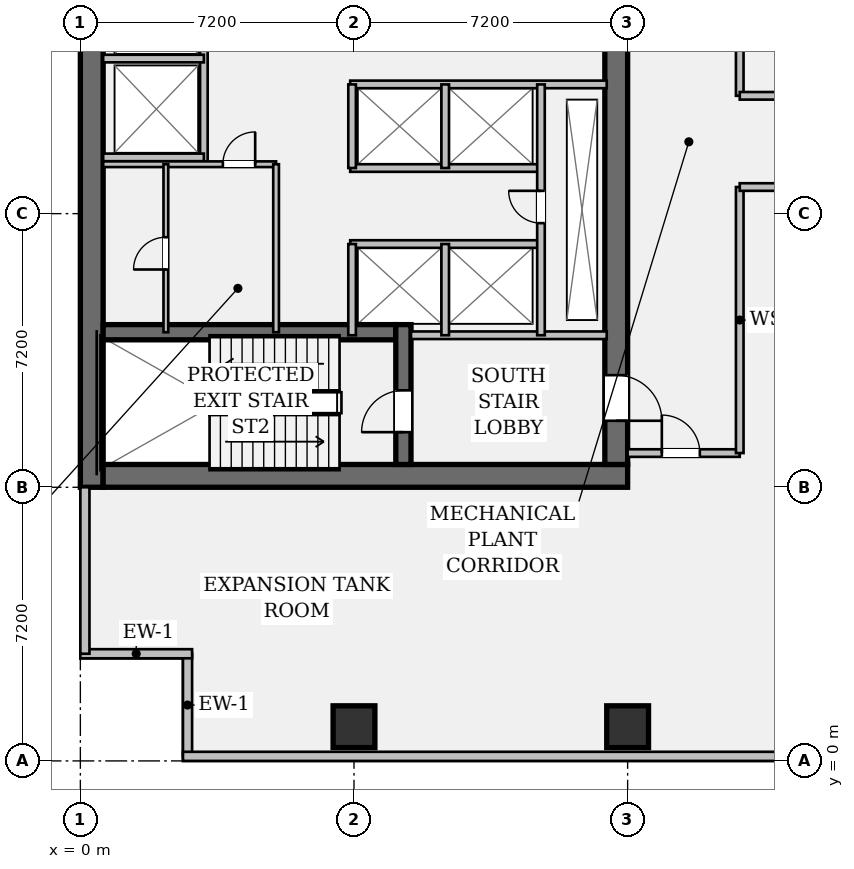
"""IFC4 building model, lengths in metres.
Left out: names, types, materials, properties, quantities, classifications, styles, units other than length and angle.
Written with IfcOpenShell. Run it as: python <this file> out.ifc"""

import sys

from ifc_helpers import new_model, si_unit, direction, frame, frame_2d, origin, origin_2d, place, context, subcontext, project, spatial, rectangle, hollow_rectangle, extrude, element, fill, save


model = new_model("IFC4")
c1 = context("Model", 3, precision=1e-05, world=origin(), true_north=direction((0.0, 1.0)))
c2 = subcontext(c1, "Body", "Model", "MODEL_VIEW")
j1 = project(units=[si_unit("LENGTHUNIT", "METRE"), si_unit("PLANEANGLEUNIT", "RADIAN")], contexts=[c1])
p1 = place(None, origin())
s1 = spatial("IfcSite", under=j1, at=p1, CompositionType="ELEMENT")
p2 = place(p1, origin())
s2 = spatial("IfcBuilding", under=s1, at=p2, CompositionType="ELEMENT")
p3 = place(p2, frame((0.0, 0.0, 26.25)))
s3 = spatial("IfcBuildingStorey", under=s2, at=p3, CompositionType="ELEMENT", Elevation=26.25)
p4 = place(p3, frame((0.3, 7.2, 0.0), z_axis=(0.0, 0.0, 1.0), x_axis=(0.0, 1.0, 0.0)))
e1 = element("IfcWall", 1, at=p4, inside=s3, PredefinedType="SHEAR", context=c2, shape_type="SweptSolid", body=[
    extrude(rectangle(XDim=28.8, YDim=0.6, at=frame_2d((14.4, 0.0))), origin(), (0.0, 0.0, 1.0), 4.62),
])
p5 = place(p3, frame((0.6, 7.5, 0.0), z_axis=(0.0, 0.0, 1.0), x_axis=(1.0, 0.0, 0.0)))
e2 = element("IfcWall", 2, at=p5, inside=s3, PredefinedType="SHEAR", context=c2, shape_type="SweptSolid", body=[
    extrude(rectangle(XDim=13.8, YDim=0.6, at=frame_2d((6.9, 0.0))), origin(), (0.0, 0.0, 1.0), 4.62),
])
p6 = place(p3, frame((14.1, 35.4, 0.0), z_axis=(0.0, 0.0, 1.0), x_axis=(0.0, -1.0, 0.0)))
e3 = element("IfcWall", 3, at=p6, inside=s3, PredefinedType="SHEAR", context=c2, shape_type="SweptSolid", body=[
    extrude(rectangle(XDim=27.6, YDim=0.6, at=frame_2d((13.8, 0.0))), origin(), (0.0, 0.0, 1.0), 4.62),
])
p7 = place(p6, frame((1.3, 0.0, 0.0)))
e4 = element("IfcOpeningElement", 4, at=p7, cuts=e3, PredefinedType="OPENING", context=c2, shape_type="SweptSolid", body=[
    extrude(rectangle(XDim=1.2, YDim=2.15, at=frame_2d((0.6, 1.075))), frame((0.0, 0.312, 0.0), z_axis=(0.0, -1.0, 0.0), x_axis=(1.0, 0.0, 0.0)), (0.0, 0.0, 1.0), 0.624),
])
p8 = place(p6, frame((25.25, 0.0, 0.0)))
e5 = element("IfcOpeningElement", 5, at=p8, cuts=e3, PredefinedType="OPENING", context=c2, shape_type="SweptSolid", body=[
    extrude(rectangle(XDim=1.2, YDim=2.15, at=frame_2d((0.6, 1.075))), frame((0.0, 0.312, 0.0), z_axis=(0.0, -1.0, 0.0), x_axis=(1.0, 0.0, 0.0)), (0.0, 0.0, 1.0), 0.624),
])
p9 = place(p6, frame((14.6, 0.0, 0.0)))
e6 = element("IfcOpeningElement", 6, at=p9, cuts=e3, PredefinedType="OPENING", context=c2, shape_type="SweptSolid", body=[
    extrude(rectangle(XDim=1.6, YDim=2.2, at=frame_2d((0.8, 1.1))), frame((0.0, 0.312, 0.0), z_axis=(0.0, -1.0, 0.0), x_axis=(1.0, 0.0, 0.0)), (0.0, 0.0, 1.0), 0.624),
])
p10 = place(p3, frame((0.6, 11.28, 0.0), z_axis=(0.0, 0.0, 1.0), x_axis=(1.0, 0.0, 0.0)))
e7 = element("IfcWall", 7, at=p10, inside=s3, PredefinedType="SHEAR", context=c2, shape_type="SweptSolid", body=[
    extrude(rectangle(XDim=7.7, YDim=0.4, at=frame_2d((3.85, 0.0))), origin(), (0.0, 0.0, 1.0), 4.62),
])
p11 = place(p3, frame((8.5, 7.8, 0.0), z_axis=(0.0, 0.0, 1.0), x_axis=(0.0, 1.0, 0.0)))
e8 = element("IfcWall", 8, at=p11, inside=s3, PredefinedType="SHEAR", context=c2, shape_type="SweptSolid", body=[
    extrude(rectangle(XDim=3.68, YDim=0.4, at=frame_2d((1.84, 0.0))), origin(), (0.0, 0.0, 1.0), 4.62),
])
p12 = place(p11, frame((0.85, 0.0, 0.0)))
e9 = element("IfcOpeningElement", 9, at=p12, cuts=e8, PredefinedType="OPENING", context=c2, shape_type="SweptSolid", body=[
    extrude(rectangle(XDim=1.1, YDim=2.15, at=frame_2d((0.55, 1.075))), frame((0.0, 0.212, 0.0), z_axis=(0.0, -1.0, 0.0), x_axis=(1.0, 0.0, 0.0)), (0.0, 0.0, 1.0), 0.424),
])
for number, where, z_axis, x_axis in (
    (10, (7.2, 0.9, 0.0), (0.0, 0.0, 1.0), (1.0, 0.0, 0.0)),
    (11, (14.4, 0.9, 0.0), (0.0, 0.0, 1.0), (1.0, 0.0, 0.0)),
):
    element("IfcColumn", number, at=place(p3, frame(where, z_axis=z_axis, x_axis=x_axis)), inside=s3, PredefinedType="COLUMN", context=c2, shape_type="SweptSolid", body=[
        extrude(hollow_rectangle(XDim=1.1, YDim=1.1, WallThickness=0.07, at=origin_2d()), origin(), (0.0, 0.0, 1.0), 4.62),
    ])
p13 = place(p3, frame((2.82, 0.12, 0.0), z_axis=(0.0, 0.0, 1.0), x_axis=(0.0, 1.0, 0.0)))
e12 = element("IfcWall", 12, at=p13, inside=s3, PredefinedType="STANDARD", context=c2, shape_type="SweptSolid", body=[
    extrude(rectangle(XDim=2.7, YDim=0.24, at=frame_2d((1.35, 0.0))), origin(), (0.0, 0.0, 1.0), 4.62),
])
p14 = place(p3, frame((2.94, 2.82, 0.0), z_axis=(0.0, 0.0, 1.0), x_axis=(-1.0, 0.0, 0.0)))
e13 = element("IfcWall", 13, at=p14, inside=s3, PredefinedType="STANDARD", context=c2, shape_type="SweptSolid", body=[
    extrude(rectangle(XDim=2.94, YDim=0.24, at=frame_2d((1.47, 0.0))), origin(), (0.0, 0.0, 1.0), 4.62),
])
p15 = place(p3, frame((0.12, 2.82, 0.0), z_axis=(0.0, 0.0, 1.0), x_axis=(0.0, 1.0, 0.0)))
e14 = element("IfcWall", 14, at=p15, inside=s3, PredefinedType="STANDARD", context=c2, shape_type="SweptSolid", body=[
    extrude(rectangle(XDim=4.38, YDim=0.24, at=frame_2d((2.19, 0.0))), origin(), (0.0, 0.0, 1.0), 4.62),
])
p16 = place(p3, frame((47.7, 0.12, 0.0), z_axis=(0.0, 0.0, 1.0), x_axis=(-1.0, 0.0, 0.0)))
e15 = element("IfcWall", 15, at=p16, inside=s3, PredefinedType="STANDARD", context=c2, shape_type="SweptSolid", body=[
    extrude(rectangle(XDim=45.0, YDim=0.24, at=frame_2d((22.5, 0.0))), origin(), (0.0, 0.0, 1.0), 4.62),
])
p17 = place(p3, frame((8.7, 11.2, 0.0), z_axis=(0.0, 0.0, 1.0), x_axis=(1.0, 0.0, 0.0)))
e16 = element("IfcWall", 16, at=p17, inside=s3, PredefinedType="PARTITIONING", context=c2, shape_type="SweptSolid", body=[
    extrude(rectangle(XDim=5.15, YDim=0.2, at=frame_2d((2.575, 0.0))), origin(), (0.0, 0.0, 1.0), 4.62),
])
p18 = place(p3, frame((3.25, 15.7, 0.0), z_axis=(0.0, 0.0, 1.0), x_axis=(0.0, 1.0, 0.0)))
e17 = element("IfcWall", 17, at=p18, inside=s3, PredefinedType="PARTITIONING", context=c2, shape_type="SweptSolid", body=[
    extrude(rectangle(XDim=13.08, YDim=0.2, at=frame_2d((6.54, 0.0))), origin(), (0.0, 0.0, 1.0), 4.62),
])
for number, where, z_axis, x_axis in (
    (18, (0.6, 15.88, 0.0), (0.0, 0.0, 1.0), (1.0, 0.0, 0.0)),
    (19, (0.6, 18.48, 0.0), (0.0, 0.0, 1.0), (1.0, 0.0, 0.0)),
):
    element("IfcWall", number, at=place(p3, frame(where, z_axis=z_axis, x_axis=x_axis)), inside=s3, PredefinedType="PARTITIONING", context=c2, shape_type="SweptSolid", body=[
        extrude(rectangle(XDim=2.65, YDim=0.2, at=frame_2d((1.325, 0.0))), origin(), (0.0, 0.0, 1.0), 4.62),
    ])
p19 = place(p3, frame((7.1, 17.8, 0.0), z_axis=(0.0, 0.0, 1.0), x_axis=(1.0, 0.0, 0.0)))
e20 = element("IfcWall", 20, at=p19, inside=s3, PredefinedType="PARTITIONING", context=c2, shape_type="SweptSolid", body=[
    extrude(rectangle(XDim=6.75, YDim=0.2, at=frame_2d((3.375, 0.0))), origin(), (0.0, 0.0, 1.0), 4.62),
])
for number, where, z_axis, x_axis in (
    (21, (7.1, 15.6, 0.0), (0.0, 0.0, 1.0), (1.0, 0.0, 0.0)),
    (22, (7.1, 13.6, 0.0), (0.0, 0.0, 1.0), (1.0, 0.0, 0.0)),
):
    element("IfcWall", number, at=place(p3, frame(where, z_axis=z_axis, x_axis=x_axis)), inside=s3, PredefinedType="PARTITIONING", context=c2, shape_type="SweptSolid", body=[
        extrude(rectangle(XDim=5.02, YDim=0.2, at=frame_2d((2.51, 0.0))), origin(), (0.0, 0.0, 1.0), 4.62),
    ])
p20 = place(p3, frame((7.15, 15.6, 0.0), z_axis=(0.0, 0.0, 1.0), x_axis=(0.0, 1.0, 0.0)))
e23 = element("IfcWall", 23, at=p20, inside=s3, PredefinedType="PARTITIONING", context=c2, shape_type="SweptSolid", body=[
    extrude(rectangle(XDim=2.2, YDim=0.2, at=frame_2d((1.1, 0.0))), origin(), (0.0, 0.0, 1.0), 4.62),
])
p21 = place(p3, frame((7.15, 11.2, 0.0), z_axis=(0.0, 0.0, 1.0), x_axis=(0.0, 1.0, 0.0)))
e24 = element("IfcWall", 24, at=p21, inside=s3, PredefinedType="PARTITIONING", context=c2, shape_type="SweptSolid", body=[
    extrude(rectangle(XDim=2.4, YDim=0.2, at=frame_2d((1.2, 0.0))), origin(), (0.0, 0.0, 1.0), 4.62),
])
p22 = place(p3, frame((9.6, 15.6, 0.0), z_axis=(0.0, 0.0, 1.0), x_axis=(0.0, 1.0, 0.0)))
e25 = element("IfcWall", 25, at=p22, inside=s3, PredefinedType="PARTITIONING", context=c2, shape_type="SweptSolid", body=[
    extrude(rectangle(XDim=2.2, YDim=0.2, at=frame_2d((1.1, 0.0))), origin(), (0.0, 0.0, 1.0), 4.62),
])
p23 = place(p3, frame((9.6, 11.2, 0.0), z_axis=(0.0, 0.0, 1.0), x_axis=(0.0, 1.0, 0.0)))
e26 = element("IfcWall", 26, at=p23, inside=s3, PredefinedType="PARTITIONING", context=c2, shape_type="SweptSolid", body=[
    extrude(rectangle(XDim=2.4, YDim=0.2, at=frame_2d((1.2, 0.0))), origin(), (0.0, 0.0, 1.0), 4.62),
])
p24 = place(p3, frame((12.12, 11.2, 0.0), z_axis=(0.0, 0.0, 1.0), x_axis=(0.0, 1.0, 0.0)))
e27 = element("IfcWall", 27, at=p24, inside=s3, PredefinedType="PARTITIONING", context=c2, shape_type="SweptSolid", body=[
    extrude(rectangle(XDim=6.6, YDim=0.2, at=frame_2d((3.3, 0.0))), origin(), (0.0, 0.0, 1.0), 4.62),
])
p25 = place(p24, frame((2.95, 0.0, 0.0)))
e28 = element("IfcOpeningElement", 28, at=p25, cuts=e27, PredefinedType="OPENING", context=c2, shape_type="SweptSolid", body=[
    extrude(rectangle(XDim=0.85, YDim=2.15, at=frame_2d((0.425, 1.075))), frame((0.0, 0.112, 0.0), z_axis=(0.0, -1.0, 0.0), x_axis=(1.0, 0.0, 0.0)), (0.0, 0.0, 1.0), 0.224),
])
p26 = place(p3, frame((0.6, 15.7, 0.0), z_axis=(0.0, 0.0, 1.0), x_axis=(1.0, 0.0, 0.0)))
e29 = element("IfcWall", 29, at=p26, inside=s3, PredefinedType="PARTITIONING", context=c2, shape_type="SweptSolid", body=[
    extrude(rectangle(XDim=4.55, YDim=0.15, at=frame_2d((2.275, 0.0))), origin(), (0.0, 0.0, 1.0), 4.62),
])
p27 = place(p26, frame((3.15, 0.0, 0.0)))
e30 = element("IfcOpeningElement", 30, at=p27, cuts=e29, PredefinedType="OPENING", context=c2, shape_type="SweptSolid", body=[
    extrude(rectangle(XDim=0.85, YDim=2.15, at=frame_2d((0.425, 1.075))), frame((0.0, 0.087, 0.0), z_axis=(0.0, -1.0, 0.0), x_axis=(1.0, 0.0, 0.0)), (0.0, 0.0, 1.0), 0.174),
])
p28 = place(p3, frame((5.15, 11.28, 0.0), z_axis=(0.0, 0.0, 1.0), x_axis=(0.0, 1.0, 0.0)))
e31 = element("IfcWall", 31, at=p28, inside=s3, PredefinedType="PARTITIONING", context=c2, shape_type="SweptSolid", body=[
    extrude(rectangle(XDim=4.42, YDim=0.15, at=frame_2d((2.21, 0.0))), origin(), (0.0, 0.0, 1.0), 4.62),
])
p29 = place(p3, frame((2.25, 11.28, 0.0), z_axis=(0.0, 0.0, 1.0), x_axis=(0.0, 1.0, 0.0)))
e32 = element("IfcWall", 32, at=p29, inside=s3, PredefinedType="PARTITIONING", context=c2, shape_type="SweptSolid", body=[
    extrude(rectangle(XDim=4.42, YDim=0.125, at=frame_2d((2.21, 0.0))), origin(), (0.0, 0.0, 1.0), 4.62),
])
p30 = place(p29, frame((1.65, 0.0, 0.0)))
e33 = element("IfcOpeningElement", 33, at=p30, cuts=e32, PredefinedType="OPENING", context=c2, shape_type="SweptSolid", body=[
    extrude(rectangle(XDim=0.85, YDim=2.15, at=frame_2d((0.425, 1.075))), frame((0.0, 0.074, 0.0), z_axis=(0.0, -1.0, 0.0), x_axis=(1.0, 0.0, 0.0)), (0.0, 0.0, 1.0), 0.149),
])
p31 = place(p3, frame((14.4, 8.1, 0.0), z_axis=(0.0, 0.0, 1.0), x_axis=(1.0, 0.0, 0.0)))
e34 = element("IfcWall", 34, at=p31, inside=s3, PredefinedType="PARTITIONING", context=c2, shape_type="SweptSolid", body=[
    extrude(rectangle(XDim=2.95, YDim=0.2, at=frame_2d((1.475, 0.0))), origin(), (0.0, 0.0, 1.0), 3.678),
])
p32 = place(p31, frame((0.9, 0.0, 0.0)))
e35 = element("IfcOpeningElement", 35, at=p32, cuts=e34, PredefinedType="OPENING", context=c2, shape_type="SweptSolid", body=[
    extrude(rectangle(XDim=1.0, YDim=2.15, at=frame_2d((0.5, 1.075))), frame((0.0, 0.112, 0.0), z_axis=(0.0, -1.0, 0.0), x_axis=(1.0, 0.0, 0.0)), (0.0, 0.0, 1.0), 0.224),
])
p33 = place(p3, frame((17.35, 8.1, 0.0), z_axis=(0.0, 0.0, 1.0), x_axis=(0.0, 1.0, 0.0)))
e36 = element("IfcWall", 36, at=p33, inside=s3, PredefinedType="PARTITIONING", context=c2, shape_type="SweptSolid", body=[
    extrude(rectangle(XDim=7.0, YDim=0.2, at=frame_2d((3.5, 0.0))), origin(), (0.0, 0.0, 1.0), 2.205),
])
p34 = place(p3, frame((17.35, 17.5, 0.0), z_axis=(0.0, 0.0, 1.0), x_axis=(0.0, 1.0, 0.0)))
e37 = element("IfcWall", 37, at=p34, inside=s3, PredefinedType="PARTITIONING", context=c2, shape_type="SweptSolid", body=[
    extrude(rectangle(XDim=17.7, YDim=0.2, at=frame_2d((8.85, 0.0))), origin(), (0.0, 0.0, 1.0), 2.205),
])
p35 = place(p34, frame((14.0, 0.0, 0.0)))
e38 = element("IfcOpeningElement", 38, at=p35, cuts=e37, PredefinedType="OPENING", context=c2, shape_type="SweptSolid", body=[
    extrude(rectangle(XDim=1.2, YDim=2.02, at=frame_2d((0.6, 1.01))), frame((0.0, 0.112, 0.0), z_axis=(0.0, -1.0, 0.0), x_axis=(1.0, 0.0, 0.0)), (0.0, 0.0, 1.0), 0.224),
])
p36 = place(p3, frame((17.35, 15.1, 0.0), z_axis=(0.0, 0.0, 1.0), x_axis=(1.0, 0.0, 0.0)))
e39 = element("IfcWall", 39, at=p36, inside=s3, PredefinedType="PARTITIONING", context=c2, shape_type="SweptSolid", body=[
    extrude(rectangle(XDim=32.89, YDim=0.2, at=frame_2d((16.445, 0.0))), origin(), (0.0, 0.0, 1.0), 3.678),
])
p37 = place(p36, frame((3.6, 0.0, 0.0)))
e40 = element("IfcOpeningElement", 40, at=p37, cuts=e39, PredefinedType="OPENING", context=c2, shape_type="SweptSolid", body=[
    extrude(rectangle(XDim=1.2, YDim=2.15, at=frame_2d((0.6, 1.075))), frame((0.0, 0.112, 0.0), z_axis=(0.0, -1.0, 0.0), x_axis=(1.0, 0.0, 0.0)), (0.0, 0.0, 1.0), 0.224),
])
p38 = place(p36, frame((14.25, 0.0, 0.0)))
e41 = element("IfcOpeningElement", 41, at=p38, cuts=e39, PredefinedType="OPENING", context=c2, shape_type="SweptSolid", body=[
    extrude(rectangle(XDim=1.2, YDim=2.15, at=frame_2d((0.6, 1.075))), frame((0.0, 0.112, 0.0), z_axis=(0.0, -1.0, 0.0), x_axis=(1.0, 0.0, 0.0)), (0.0, 0.0, 1.0), 0.224),
])
p39 = place(p3, frame((17.35, 17.5, 0.0), z_axis=(0.0, 0.0, 1.0), x_axis=(1.0, 0.0, 0.0)))
e42 = element("IfcWall", 42, at=p39, inside=s3, PredefinedType="PARTITIONING", context=c2, shape_type="SweptSolid", body=[
    extrude(rectangle(XDim=32.89, YDim=0.2, at=frame_2d((16.445, 0.0))), origin(), (0.0, 0.0, 1.0), 3.678),
])
p40 = place(p39, frame((9.4, 0.0, 0.0)))
e43 = element("IfcOpeningElement", 43, at=p40, cuts=e42, PredefinedType="OPENING", context=c2, shape_type="SweptSolid", body=[
    extrude(rectangle(XDim=1.2, YDim=2.15, at=frame_2d((0.6, 1.075))), frame((0.0, 0.112, 0.0), z_axis=(0.0, -1.0, 0.0), x_axis=(1.0, 0.0, 0.0)), (0.0, 0.0, 1.0), 0.224),
])
p41 = place(p12, origin())
e44 = element("IfcDoor", 44, at=p41, inside=s3, OperationType="SINGLE_SWING_LEFT", PredefinedType="DOOR", context=c2, shape_type="SweptSolid", body=[
    extrude(rectangle(XDim=1.1, YDim=2.15, at=frame_2d((0.55, 1.075))), frame((0.0, 0.025, 0.0), z_axis=(0.0, -1.0, 0.0), x_axis=(1.0, 0.0, 0.0)), (0.0, 0.0, 1.0), 0.05),
])
fill(e9, e44)
p42 = place(p8, origin())
e45 = element("IfcDoor", 45, at=p42, inside=s3, OperationType="SINGLE_SWING_RIGHT", PredefinedType="DOOR", context=c2, shape_type="SweptSolid", body=[
    extrude(rectangle(XDim=1.2, YDim=2.15, at=frame_2d((0.6, 1.075))), frame((0.0, 0.025, 0.0), z_axis=(0.0, -1.0, 0.0), x_axis=(1.0, 0.0, 0.0)), (0.0, 0.0, 1.0), 0.05),
])
fill(e5, e45)
p43 = place(p25, origin())
e46 = element("IfcDoor", 46, at=p43, inside=s3, OperationType="SINGLE_SWING_RIGHT", PredefinedType="DOOR", context=c2, shape_type="SweptSolid", body=[
    extrude(rectangle(XDim=0.85, YDim=2.15, at=frame_2d((0.425, 1.075))), frame((0.0, 0.025, 0.0), z_axis=(0.0, -1.0, 0.0), x_axis=(1.0, 0.0, 0.0)), (0.0, 0.0, 1.0), 0.05),
])
fill(e28, e46)
p44 = place(p27, origin())
e47 = element("IfcDoor", 47, at=p44, inside=s3, OperationType="SINGLE_SWING_RIGHT", PredefinedType="DOOR", context=c2, shape_type="SweptSolid", body=[
    extrude(rectangle(XDim=0.85, YDim=2.15, at=frame_2d((0.425, 1.075))), frame((0.0, 0.025, 0.0), z_axis=(0.0, -1.0, 0.0), x_axis=(1.0, 0.0, 0.0)), (0.0, 0.0, 1.0), 0.05),
])
fill(e30, e47)
p45 = place(p30, origin())
e48 = element("IfcDoor", 48, at=p45, inside=s3, OperationType="SINGLE_SWING_LEFT", PredefinedType="DOOR", context=c2, shape_type="SweptSolid", body=[
    extrude(rectangle(XDim=0.85, YDim=2.15, at=frame_2d((0.425, 1.075))), frame((0.0, 0.025, 0.0), z_axis=(0.0, -1.0, 0.0), x_axis=(1.0, 0.0, 0.0)), (0.0, 0.0, 1.0), 0.05),
])
fill(e33, e48)
p46 = place(p32, origin())
e49 = element("IfcDoor", 49, at=p46, inside=s3, OperationType="SINGLE_SWING_LEFT", PredefinedType="DOOR", context=c2, shape_type="SweptSolid", body=[
    extrude(rectangle(XDim=1.0, YDim=2.15, at=frame_2d((0.5, 1.075))), frame((0.0, 0.025, 0.0), z_axis=(0.0, -1.0, 0.0), x_axis=(1.0, 0.0, 0.0)), (0.0, 0.0, 1.0), 0.05),
])
fill(e35, e49)
save(model, sys.argv[1])
